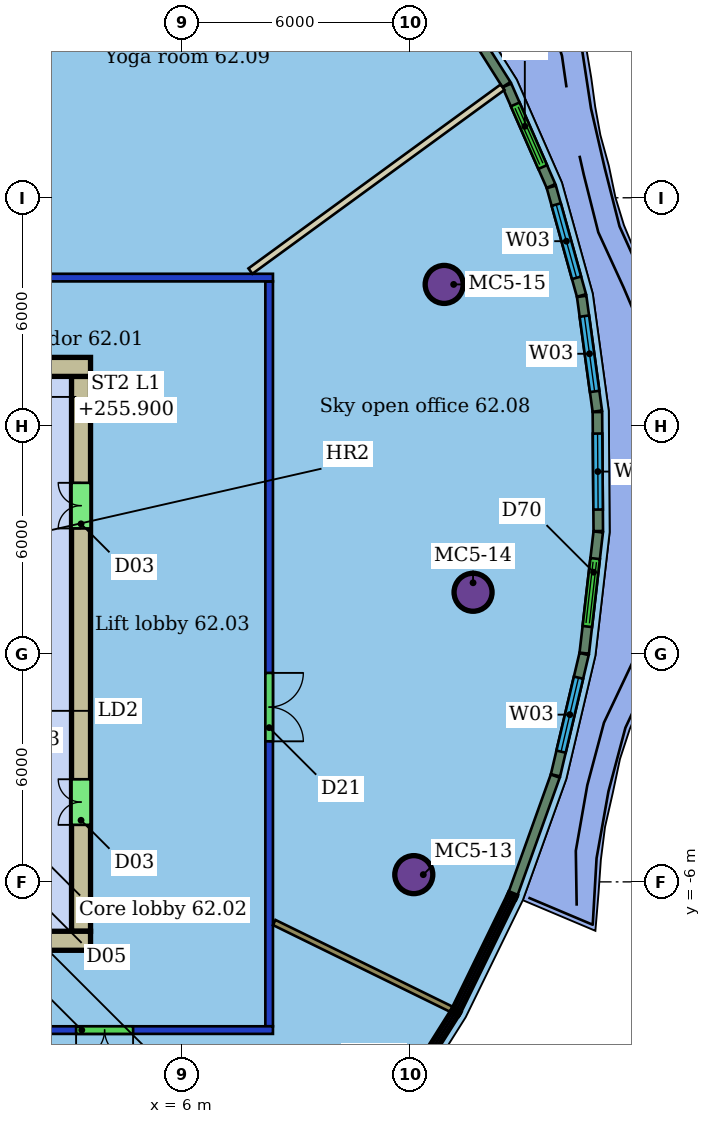
"""IFC4 building model, lengths in metres.
Left out: names, types, materials, properties, quantities, classifications, styles, units other than length and angle.
Written with IfcOpenShell. Run it as: python <this file> out.ifc"""

import sys

from ifc_helpers import new_model, si_unit, direction, frame, frame_2d, origin, origin_2d, place, context, subcontext, project, spatial, rectangle, hollow_circle, extrude, element, fill, save


model = new_model("IFC4")
c1 = context("Model", 3, precision=1e-05, world=origin(), true_north=direction((0.0, 1.0)))
c2 = subcontext(c1, "Body", "Model", "MODEL_VIEW")
j1 = project(units=[si_unit("LENGTHUNIT", "METRE"), si_unit("PLANEANGLEUNIT", "RADIAN")], contexts=[c1])
p1 = place(None, origin())
s1 = spatial("IfcSite", under=j1, at=p1, CompositionType="ELEMENT")
p2 = place(p1, origin())
s2 = spatial("IfcBuilding", under=s1, at=p2, CompositionType="ELEMENT")
p3 = place(p2, frame((0.0, 0.0, 254.1)))
s3 = spatial("IfcBuildingStorey", under=s2, at=p3, CompositionType="ELEMENT", Elevation=254.1)
for number, where, z_axis, x_axis in (
    (1, (12.106, -5.81, 0.0), (0.0, 0.0, 1.0), (1.0, 0.0, 0.0)),
    (2, (13.666, 1.62, 0.0), (0.0, 0.0, 1.0), (1.0, 0.0, 0.0)),
    (3, (12.906, 9.72, 0.0), (0.0, 0.0, 1.0), (1.0, 0.0, 0.0)),
):
    element("IfcColumn", number, at=place(p3, frame(where, z_axis=z_axis, x_axis=x_axis)), inside=s3, PredefinedType="COLUMN", context=c2, shape_type="SweptSolid", body=[
        extrude(hollow_circle(Radius=0.5, WallThickness=0.04, at=origin_2d()), origin(), (0.0, 0.0, 1.0), 3.45),
    ])
p4 = place(p3, frame((8.4, -9.9, 0.0), z_axis=(0.0, 0.0, 1.0), x_axis=(-1.0, 0.0, 0.0)))
e4 = element("IfcWall", 4, at=p4, inside=s3, PredefinedType="PARTITIONING", context=c2, shape_type="SweptSolid", body=[
    extrude(rectangle(XDim=28.8, YDim=0.2, at=frame_2d((14.4, 0.0))), origin(), (0.0, 0.0, 1.0), 3.1),
])
p5 = place(p4, frame((23.126, 0.0, 0.0)))
e5 = element("IfcOpeningElement", 5, at=p5, cuts=e4, PredefinedType="OPENING", context=c2, shape_type="SweptSolid", body=[
    extrude(rectangle(XDim=1.8, YDim=2.4, at=frame_2d((0.9, 1.2))), frame((0.0, 0.11, 0.0), z_axis=(0.0, -1.0, 0.0), x_axis=(1.0, 0.0, 0.0)), (0.0, 0.0, 1.0), 0.22),
])
p6 = place(p4, frame((17.523, 0.0, 0.0)))
e6 = element("IfcOpeningElement", 6, at=p6, cuts=e4, PredefinedType="OPENING", context=c2, shape_type="SweptSolid", body=[
    extrude(rectangle(XDim=1.5, YDim=2.4, at=frame_2d((0.75, 1.2))), frame((0.0, 0.11, 0.0), z_axis=(0.0, -1.0, 0.0), x_axis=(1.0, 0.0, 0.0)), (0.0, 0.0, 1.0), 0.22),
])
p7 = place(p4, frame((8.52, 0.0, 0.0)))
e7 = element("IfcOpeningElement", 7, at=p7, cuts=e4, PredefinedType="OPENING", context=c2, shape_type="SweptSolid", body=[
    extrude(rectangle(XDim=0.9, YDim=2.1, at=frame_2d((0.45, 1.05))), frame((0.0, 0.11, 0.0), z_axis=(0.0, -1.0, 0.0), x_axis=(1.0, 0.0, 0.0)), (0.0, 0.0, 1.0), 0.22),
])
p8 = place(p4, frame((3.68, 0.0, 0.0)))
e8 = element("IfcOpeningElement", 8, at=p8, cuts=e4, PredefinedType="OPENING", context=c2, shape_type="SweptSolid", body=[
    extrude(rectangle(XDim=1.5, YDim=2.1, at=frame_2d((0.75, 1.05))), frame((0.0, 0.11, 0.0), z_axis=(0.0, -1.0, 0.0), x_axis=(1.0, 0.0, 0.0)), (0.0, 0.0, 1.0), 0.22),
])
p9 = place(p3, frame((-20.4, 9.9, 0.0), z_axis=(0.0, 0.0, 1.0), x_axis=(1.0, 0.0, 0.0)))
e9 = element("IfcWall", 9, at=p9, inside=s3, PredefinedType="PARTITIONING", context=c2, shape_type="SweptSolid", body=[
    extrude(rectangle(XDim=28.8, YDim=0.2, at=frame_2d((14.4, 0.0))), origin(), (0.0, 0.0, 1.0), 3.1),
])
p10 = place(p9, frame((10.218, 0.0, 0.0)))
e10 = element("IfcOpeningElement", 10, at=p10, cuts=e9, PredefinedType="OPENING", context=c2, shape_type="SweptSolid", body=[
    extrude(rectangle(XDim=1.5, YDim=2.1, at=frame_2d((0.75, 1.05))), frame((0.0, 0.11, 0.0), z_axis=(0.0, -1.0, 0.0), x_axis=(1.0, 0.0, 0.0)), (0.0, 0.0, 1.0), 0.22),
])
p11 = place(p9, frame((21.358, 0.0, 0.0)))
e11 = element("IfcOpeningElement", 11, at=p11, cuts=e9, PredefinedType="OPENING", context=c2, shape_type="SweptSolid", body=[
    extrude(rectangle(XDim=1.0, YDim=2.1, at=frame_2d((0.5, 1.05))), frame((0.0, 0.11, 0.0), z_axis=(0.0, -1.0, 0.0), x_axis=(1.0, 0.0, 0.0)), (0.0, 0.0, 1.0), 0.22),
])
p12 = place(p3, frame((8.3, 9.8, 0.0), z_axis=(0.0, 0.0, 1.0), x_axis=(0.0, -1.0, 0.0)))
e12 = element("IfcWall", 12, at=p12, inside=s3, PredefinedType="PARTITIONING", context=c2, shape_type="SweptSolid", body=[
    extrude(rectangle(XDim=19.6, YDim=0.2, at=frame_2d((9.8, 0.0))), origin(), (0.0, 0.0, 1.0), 3.1),
])
p13 = place(p12, frame((10.302, 0.0, 0.0)))
e13 = element("IfcOpeningElement", 13, at=p13, cuts=e12, PredefinedType="OPENING", context=c2, shape_type="SweptSolid", body=[
    extrude(rectangle(XDim=1.8, YDim=2.1, at=frame_2d((0.9, 1.05))), frame((0.0, 0.11, 0.0), z_axis=(0.0, -1.0, 0.0), x_axis=(1.0, 0.0, 0.0)), (0.0, 0.0, 1.0), 0.22),
])
p14 = place(p3, frame((4.018, 23.611, 0.0), z_axis=(0.0, 0.0, 1.0), x_axis=(-0.390584280832, -0.920567172762, 0.0)))
e14 = element("IfcWall", 14, at=p14, inside=s3, PredefinedType="PARTITIONING", context=c2, shape_type="SweptSolid", body=[
    extrude(rectangle(XDim=14.748, YDim=0.175, at=frame_2d((7.374, 0.0))), origin(), (0.0, 0.0, 1.0), 3.45),
])
p15 = place(p3, frame((6.807, -17.308, 0.0), z_axis=(0.0, 0.0, 1.0), x_axis=(-0.594825545765, 0.803854819047, 0.0)))
e15 = element("IfcWall", 15, at=p15, inside=s3, PredefinedType="PARTITIONING", context=c2, shape_type="SweptSolid", body=[
    extrude(rectangle(XDim=9.035, YDim=0.15, at=frame_2d((4.518, 0.0))), origin(), (0.0, 0.0, 1.0), 3.45),
])
p16 = place(p3, frame((13.101, -9.354, 0.0), z_axis=(0.0, 0.0, 1.0), x_axis=(-0.898079749188, 0.439832654652, 0.0)))
e16 = element("IfcWall", 16, at=p16, inside=s3, PredefinedType="PARTITIONING", context=c2, shape_type="SweptSolid", body=[
    extrude(rectangle(XDim=5.197, YDim=0.15, at=frame_2d((2.599, 0.0))), origin(), (0.0, 0.0, 1.0), 3.45),
])
p17 = place(p3, frame((14.44, 14.909, 0.0), z_axis=(0.0, 0.0, 1.0), x_axis=(-0.807914917883, -0.589299147685, 0.0)))
e17 = element("IfcWall", 17, at=p17, inside=s3, PredefinedType="PARTITIONING", context=c2, shape_type="SweptSolid", body=[
    extrude(rectangle(XDim=8.21, YDim=0.175, at=frame_2d((4.105, 0.0))), origin(), (0.0, 0.0, 1.0), 3.45),
])
p18 = place(p3, frame((14.718, -6.313, 0.0), z_axis=(0.0, 0.0, 1.0), x_axis=(0.337652360294, 0.941270887464, 0.0)))
e18 = element("IfcWall", 18, at=p18, inside=s3, PredefinedType="SOLIDWALL", context=c2, shape_type="SweptSolid", body=[
    extrude(rectangle(XDim=3.29, YDim=0.25, at=frame_2d((1.645, 0.0))), origin(), (0.0, 0.0, 1.0), 3.15),
])
p19 = place(p3, frame((15.835, -3.196, 0.0), z_axis=(0.0, 0.0, 1.0), x_axis=(0.229620288748, 0.973280290048, 0.0)))
e19 = element("IfcWall", 19, at=p19, inside=s3, PredefinedType="SOLIDWALL", context=c2, shape_type="SweptSolid", body=[
    extrude(rectangle(XDim=3.279, YDim=0.25, at=frame_2d((1.64, 0.0))), origin(), (0.0, 0.0, 1.0), 3.15),
])
p20 = place(p19, frame((0.639, 0.0, 0.9)))
e20 = element("IfcOpeningElement", 20, at=p20, cuts=e19, PredefinedType="OPENING", context=c2, shape_type="SweptSolid", body=[
    extrude(rectangle(XDim=2.0, YDim=2.1, at=frame_2d((1.0, 1.05))), frame((0.0, 0.135, 0.0), z_axis=(0.0, -1.0, 0.0), x_axis=(1.0, 0.0, 0.0)), (0.0, 0.0, 1.0), 0.27),
])
p21 = place(p3, frame((16.592, 0.018, 0.0), z_axis=(0.0, 0.0, 1.0), x_axis=(0.114612561175, 0.993410268127, 0.0)))
e21 = element("IfcWall", 21, at=p21, inside=s3, PredefinedType="SOLIDWALL", context=c2, shape_type="SweptSolid", body=[
    extrude(rectangle(XDim=3.21, YDim=0.25, at=frame_2d((1.605, 0.0))), origin(), (0.0, 0.0, 1.0), 3.15),
])
p22 = place(p21, frame((0.705, 0.0, 0.0)))
e22 = element("IfcOpeningElement", 22, at=p22, cuts=e21, PredefinedType="OPENING", context=c2, shape_type="SweptSolid", body=[
    extrude(rectangle(XDim=1.8, YDim=2.4, at=frame_2d((0.9, 1.2))), frame((0.0, 0.135, 0.0), z_axis=(0.0, -1.0, 0.0), x_axis=(1.0, 0.0, 0.0)), (0.0, 0.0, 1.0), 0.27),
])
p23 = place(p3, frame((16.961, 3.23, 0.0), z_axis=(0.0, 0.0, 1.0), x_axis=(-0.007406626712, 0.999972570564, 0.0)))
e23 = element("IfcWall", 23, at=p23, inside=s3, PredefinedType="SOLIDWALL", context=c2, shape_type="SweptSolid", body=[
    extrude(rectangle(XDim=3.131, YDim=0.25, at=frame_2d((1.566, 0.0))), origin(), (0.0, 0.0, 1.0), 3.15),
])
p24 = place(p23, frame((0.566, 0.0, 0.9)))
e24 = element("IfcOpeningElement", 24, at=p24, cuts=e23, PredefinedType="OPENING", context=c2, shape_type="SweptSolid", body=[
    extrude(rectangle(XDim=2.0, YDim=2.1, at=frame_2d((1.0, 1.05))), frame((0.0, 0.135, 0.0), z_axis=(0.0, -1.0, 0.0), x_axis=(1.0, 0.0, 0.0)), (0.0, 0.0, 1.0), 0.27),
])
p25 = place(p3, frame((16.936, 6.386, 0.0), z_axis=(0.0, 0.0, 1.0), x_axis=(-0.135295507902, 0.990805291438, 0.0)))
e25 = element("IfcWall", 25, at=p25, inside=s3, PredefinedType="SOLIDWALL", context=c2, shape_type="SweptSolid", body=[
    extrude(rectangle(XDim=3.048, YDim=0.25, at=frame_2d((1.524, 0.0))), origin(), (0.0, 0.0, 1.0), 3.15),
])
p26 = place(p25, frame((0.524, 0.0, 0.9)))
e26 = element("IfcOpeningElement", 26, at=p26, cuts=e25, PredefinedType="OPENING", context=c2, shape_type="SweptSolid", body=[
    extrude(rectangle(XDim=2.0, YDim=2.1, at=frame_2d((1.0, 1.05))), frame((0.0, 0.135, 0.0), z_axis=(0.0, -1.0, 0.0), x_axis=(1.0, 0.0, 0.0)), (0.0, 0.0, 1.0), 0.27),
])
p27 = place(p3, frame((16.518, 9.43, 0.0), z_axis=(0.0, 0.0, 1.0), x_axis=(-0.267622628511, 0.963523808065, 0.0)))
e27 = element("IfcWall", 27, at=p27, inside=s3, PredefinedType="SOLIDWALL", context=c2, shape_type="SweptSolid", body=[
    extrude(rectangle(XDim=2.965, YDim=0.25, at=frame_2d((1.482, 0.0))), origin(), (0.0, 0.0, 1.0), 3.15),
])
p28 = place(p27, frame((0.482, 0.0, 0.9)))
e28 = element("IfcOpeningElement", 28, at=p28, cuts=e27, PredefinedType="OPENING", context=c2, shape_type="SweptSolid", body=[
    extrude(rectangle(XDim=2.0, YDim=2.1, at=frame_2d((1.0, 1.05))), frame((0.0, 0.135, 0.0), z_axis=(0.0, -1.0, 0.0), x_axis=(1.0, 0.0, 0.0)), (0.0, 0.0, 1.0), 0.27),
])
p29 = place(p3, frame((15.716, 12.311, 0.0), z_axis=(0.0, 0.0, 1.0), x_axis=(-0.401639105758, 0.915798028348, 0.0)))
e29 = element("IfcWall", 29, at=p29, inside=s3, PredefinedType="SOLIDWALL", context=c2, shape_type="SweptSolid", body=[
    extrude(rectangle(XDim=2.888, YDim=0.25, at=frame_2d((1.444, 0.0))), origin(), (0.0, 0.0, 1.0), 3.15),
])
p30 = place(p29, frame((0.544, 0.0, 0.0)))
e30 = element("IfcOpeningElement", 30, at=p30, cuts=e29, PredefinedType="OPENING", context=c2, shape_type="SweptSolid", body=[
    extrude(rectangle(XDim=1.8, YDim=2.4, at=frame_2d((0.9, 1.2))), frame((0.0, 0.135, 0.0), z_axis=(0.0, -1.0, 0.0), x_axis=(1.0, 0.0, 0.0)), (0.0, 0.0, 1.0), 0.27),
])
p31 = place(p3, frame((14.544, 14.979, 0.0), z_axis=(0.0, 0.0, 1.0), x_axis=(-0.533094811272, 0.846055507751, 0.0)))
e31 = element("IfcWall", 31, at=p31, inside=s3, PredefinedType="SOLIDWALL", context=c2, shape_type="SweptSolid", body=[
    extrude(rectangle(XDim=2.783, YDim=0.25, at=frame_2d((1.391, 0.0))), origin(), (0.0, 0.0, 1.0), 3.15),
])
p32 = place(p3, frame((3.6, 7.55, 0.0), z_axis=(0.0, 0.0, 1.0), x_axis=(-1.0, 0.0, 0.0)))
e32 = element("IfcWall", 32, at=p32, inside=s3, PredefinedType="SHEAR", context=c2, shape_type="SweptSolid", body=[
    extrude(rectangle(XDim=9.6, YDim=0.5, at=frame_2d((4.8, 0.0))), origin(), (0.0, 0.0, 1.0), 3.3),
])
p33 = place(p32, frame((3.2, 0.0, 0.0)))
e33 = element("IfcOpeningElement", 33, at=p33, cuts=e32, PredefinedType="OPENING", context=c2, shape_type="SweptSolid", body=[
    extrude(rectangle(XDim=1.2, YDim=2.1, at=frame_2d((0.6, 1.05))), frame((0.0, 0.26, 0.0), z_axis=(0.0, -1.0, 0.0), x_axis=(1.0, 0.0, 0.0)), (0.0, 0.0, 1.0), 0.52),
])
p34 = place(p3, frame((-15.6, -7.55, 0.0), z_axis=(0.0, 0.0, 1.0), x_axis=(1.0, 0.0, 0.0)))
e34 = element("IfcWall", 34, at=p34, inside=s3, PredefinedType="SHEAR", context=c2, shape_type="SweptSolid", body=[
    extrude(rectangle(XDim=19.2, YDim=0.5, at=frame_2d((9.6, 0.0))), origin(), (0.0, 0.0, 1.0), 3.3),
])
p35 = place(p34, frame((3.6, 0.0, 0.0)))
e35 = element("IfcOpeningElement", 35, at=p35, cuts=e34, PredefinedType="OPENING", context=c2, shape_type="SweptSolid", body=[
    extrude(rectangle(XDim=1.2, YDim=2.1, at=frame_2d((0.6, 1.05))), frame((0.0, 0.26, 0.0), z_axis=(0.0, -1.0, 0.0), x_axis=(1.0, 0.0, 0.0)), (0.0, 0.0, 1.0), 0.52),
])
p36 = place(p3, frame((3.35, -7.3, 0.0), z_axis=(0.0, 0.0, 1.0), x_axis=(0.0, 1.0, 0.0)))
e36 = element("IfcWall", 36, at=p36, inside=s3, PredefinedType="SHEAR", context=c2, shape_type="SweptSolid", body=[
    extrude(rectangle(XDim=14.6, YDim=0.5, at=frame_2d((7.3, 0.0))), origin(), (0.0, 0.0, 1.0), 3.3),
])
p37 = place(p36, frame((2.8, 0.0, 0.0)))
e37 = element("IfcOpeningElement", 37, at=p37, cuts=e36, PredefinedType="OPENING", context=c2, shape_type="SweptSolid", body=[
    extrude(rectangle(XDim=1.2, YDim=2.1, at=frame_2d((0.6, 1.05))), frame((0.0, 0.26, 0.0), z_axis=(0.0, -1.0, 0.0), x_axis=(1.0, 0.0, 0.0)), (0.0, 0.0, 1.0), 0.52),
])
p38 = place(p36, frame((10.6, 0.0, 0.0)))
e38 = element("IfcOpeningElement", 38, at=p38, cuts=e36, PredefinedType="OPENING", context=c2, shape_type="SweptSolid", body=[
    extrude(rectangle(XDim=1.2, YDim=2.1, at=frame_2d((0.6, 1.05))), frame((0.0, 0.26, 0.0), z_axis=(0.0, -1.0, 0.0), x_axis=(1.0, 0.0, 0.0)), (0.0, 0.0, 1.0), 0.52),
])
p39 = place(p8, origin())
e39 = element("IfcDoor", 39, at=p39, inside=s3, OperationType="DOUBLE_DOOR_SINGLE_SWING", PredefinedType="DOOR", context=c2, shape_type="SweptSolid", body=[
    extrude(rectangle(XDim=1.5, YDim=2.1, at=frame_2d((0.75, 1.05))), frame((0.0, 0.025, 0.0), z_axis=(0.0, -1.0, 0.0), x_axis=(1.0, 0.0, 0.0)), (0.0, 0.0, 1.0), 0.05),
])
fill(e8, e39)
p40 = place(p13, origin())
e40 = element("IfcDoor", 40, at=p40, inside=s3, OperationType="DOUBLE_DOOR_SINGLE_SWING", PredefinedType="DOOR", context=c2, shape_type="SweptSolid", body=[
    extrude(rectangle(XDim=1.8, YDim=2.1, at=frame_2d((0.9, 1.05))), frame((0.0, 0.025, 0.0), z_axis=(0.0, -1.0, 0.0), x_axis=(1.0, 0.0, 0.0)), (0.0, 0.0, 1.0), 0.05),
])
fill(e13, e40)
p41 = place(p20, origin())
e41 = element("IfcWindow", 41, at=p41, inside=s3, PartitioningType="SINGLE_PANEL", PredefinedType="WINDOW", context=c2, shape_type="SweptSolid", body=[
    extrude(rectangle(XDim=2.0, YDim=2.1, at=frame_2d((1.0, 1.05))), frame((0.0, 0.03, 0.0), z_axis=(0.0, -1.0, 0.0), x_axis=(1.0, 0.0, 0.0)), (0.0, 0.0, 1.0), 0.06),
])
fill(e20, e41)
p42 = place(p22, origin())
e42 = element("IfcDoor", 42, at=p42, inside=s3, OperationType="DOUBLE_DOOR_SLIDING", PredefinedType="DOOR", context=c2, shape_type="SweptSolid", body=[
    extrude(rectangle(XDim=1.8, YDim=2.4, at=frame_2d((0.9, 1.2))), frame((0.0, 0.025, 0.0), z_axis=(0.0, -1.0, 0.0), x_axis=(1.0, 0.0, 0.0)), (0.0, 0.0, 1.0), 0.05),
])
fill(e22, e42)
p43 = place(p24, origin())
e43 = element("IfcWindow", 43, at=p43, inside=s3, PartitioningType="SINGLE_PANEL", PredefinedType="WINDOW", context=c2, shape_type="SweptSolid", body=[
    extrude(rectangle(XDim=2.0, YDim=2.1, at=frame_2d((1.0, 1.05))), frame((0.0, 0.03, 0.0), z_axis=(0.0, -1.0, 0.0), x_axis=(1.0, 0.0, 0.0)), (0.0, 0.0, 1.0), 0.06),
])
fill(e24, e43)
p44 = place(p26, origin())
e44 = element("IfcWindow", 44, at=p44, inside=s3, PartitioningType="SINGLE_PANEL", PredefinedType="WINDOW", context=c2, shape_type="SweptSolid", body=[
    extrude(rectangle(XDim=2.0, YDim=2.1, at=frame_2d((1.0, 1.05))), frame((0.0, 0.03, 0.0), z_axis=(0.0, -1.0, 0.0), x_axis=(1.0, 0.0, 0.0)), (0.0, 0.0, 1.0), 0.06),
])
fill(e26, e44)
p45 = place(p28, origin())
e45 = element("IfcWindow", 45, at=p45, inside=s3, PartitioningType="SINGLE_PANEL", PredefinedType="WINDOW", context=c2, shape_type="SweptSolid", body=[
    extrude(rectangle(XDim=2.0, YDim=2.1, at=frame_2d((1.0, 1.05))), frame((0.0, 0.03, 0.0), z_axis=(0.0, -1.0, 0.0), x_axis=(1.0, 0.0, 0.0)), (0.0, 0.0, 1.0), 0.06),
])
fill(e28, e45)
p46 = place(p30, origin())
e46 = element("IfcDoor", 46, at=p46, inside=s3, OperationType="DOUBLE_DOOR_SLIDING", PredefinedType="DOOR", context=c2, shape_type="SweptSolid", body=[
    extrude(rectangle(XDim=1.8, YDim=2.4, at=frame_2d((0.9, 1.2))), frame((0.0, 0.025, 0.0), z_axis=(0.0, -1.0, 0.0), x_axis=(1.0, 0.0, 0.0)), (0.0, 0.0, 1.0), 0.05),
])
fill(e30, e46)
p47 = place(p37, origin())
e47 = element("IfcDoor", 47, at=p47, inside=s3, OperationType="DOUBLE_DOOR_SINGLE_SWING", PredefinedType="NOTDEFINED", context=c2, shape_type="SweptSolid", body=[
    extrude(rectangle(XDim=1.2, YDim=2.1, at=frame_2d((0.6, 1.05))), frame((0.0, 0.025, 0.0), z_axis=(0.0, -1.0, 0.0), x_axis=(1.0, 0.0, 0.0)), (0.0, 0.0, 1.0), 0.05),
])
fill(e37, e47)
p48 = place(p38, origin())
e48 = element("IfcDoor", 48, at=p48, inside=s3, OperationType="DOUBLE_DOOR_SINGLE_SWING", PredefinedType="NOTDEFINED", context=c2, shape_type="SweptSolid", body=[
    extrude(rectangle(XDim=1.2, YDim=2.1, at=frame_2d((0.6, 1.05))), frame((0.0, 0.025, 0.0), z_axis=(0.0, -1.0, 0.0), x_axis=(1.0, 0.0, 0.0)), (0.0, 0.0, 1.0), 0.05),
])
fill(e38, e48)
save(model, sys.argv[1])
